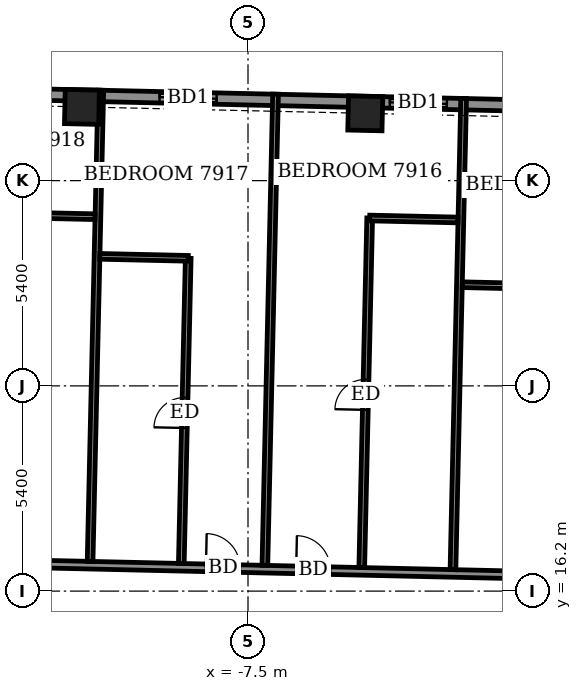
"""IFC4 building model, lengths in metres.
Left out: names, types, materials, properties, quantities, classifications, styles, units other than length and angle.
Written with IfcOpenShell. Run it as: python <this file> out.ifc"""

import sys

from ifc_helpers import new_model, si_unit, direction, frame, frame_2d, origin, origin_2d, place, context, subcontext, project, spatial, rectangle, extrude, element, fill, save


model = new_model("IFC4")
c1 = context("Model", 3, precision=1e-05, world=origin(), true_north=direction((0.0, 1.0)))
c2 = subcontext(c1, "Body", "Model", "MODEL_VIEW")
j1 = project(units=[si_unit("LENGTHUNIT", "METRE"), si_unit("PLANEANGLEUNIT", "RADIAN")], contexts=[c1])
p1 = place(None, origin())
s1 = spatial("IfcSite", under=j1, at=p1, CompositionType="ELEMENT")
p2 = place(p1, origin())
s2 = spatial("IfcBuilding", under=s1, at=p2, CompositionType="ELEMENT")
p3 = place(p2, frame((0.0, 0.0, 309.7)))
s3 = spatial("IfcBuildingStorey", under=s2, at=p3, CompositionType="ELEMENT", Elevation=309.7)
for number, where, z_axis, x_axis in (
    (1, (-4.414, 28.771, -0.55), (0.0, 0.0, 1.0), (-1.0, 0.023, 0.0)),
    (2, (-11.869, 28.94, -0.55), (0.0, 0.0, 1.0), (-1.0, 0.023, 0.0)),
):
    element("IfcColumn", number, at=place(p3, frame(where, z_axis=z_axis, x_axis=x_axis)), inside=s3, PredefinedType="COLUMN", context=c2, shape_type="SweptSolid", body=[
        extrude(rectangle(XDim=0.9, YDim=0.9, at=origin_2d()), origin(), (0.0, 0.0, 1.0), 3.6),
    ])
p4 = place(p3, frame((25.264, 28.397, 0.0), z_axis=(0.0, 0.0, 1.0), x_axis=(-0.999742391375, 0.022696935658, 0.0)))
e3 = element("IfcWall", 3, at=p4, inside=s3, PredefinedType="SOLIDWALL", context=c2, shape_type="SweptSolid", body=[
    extrude(rectangle(XDim=51.9, YDim=0.3, at=frame_2d((25.95, 0.0))), origin(), (0.0, 0.0, 1.0), 2.5),
])
p5 = place(p4, frame((1.898, 0.0, 0.0)))
e4 = element("IfcOpeningElement", 4, at=p5, cuts=e3, PredefinedType="OPENING", context=c2, shape_type="SweptSolid", body=[
    extrude(rectangle(XDim=1.5, YDim=2.4, at=frame_2d((0.75, 1.2))), frame((0.0, 0.16, 0.0), z_axis=(0.0, -1.0, 0.0), x_axis=(1.0, 0.0, 0.0)), (0.0, 0.0, 1.0), 0.32),
])
p6 = place(p4, frame((5.229, 0.0, 0.0)))
e5 = element("IfcOpeningElement", 5, at=p6, cuts=e3, PredefinedType="OPENING", context=c2, shape_type="SweptSolid", body=[
    extrude(rectangle(XDim=1.5, YDim=2.4, at=frame_2d((0.75, 1.2))), frame((0.0, 0.16, 0.0), z_axis=(0.0, -1.0, 0.0), x_axis=(1.0, 0.0, 0.0)), (0.0, 0.0, 1.0), 0.32),
])
p7 = place(p4, frame((10.7, 0.0, 0.0)))
e6 = element("IfcOpeningElement", 6, at=p7, cuts=e3, PredefinedType="OPENING", context=c2, shape_type="SweptSolid", body=[
    extrude(rectangle(XDim=1.5, YDim=2.4, at=frame_2d((0.75, 1.2))), frame((0.0, 0.16, 0.0), z_axis=(0.0, -1.0, 0.0), x_axis=(1.0, 0.0, 0.0)), (0.0, 0.0, 1.0), 0.32),
])
p8 = place(p4, frame((15.832, 0.0, 0.0)))
e7 = element("IfcOpeningElement", 7, at=p8, cuts=e3, PredefinedType="OPENING", context=c2, shape_type="SweptSolid", body=[
    extrude(rectangle(XDim=1.5, YDim=2.4, at=frame_2d((0.75, 1.2))), frame((0.0, 0.16, 0.0), z_axis=(0.0, -1.0, 0.0), x_axis=(1.0, 0.0, 0.0)), (0.0, 0.0, 1.0), 0.32),
])
p9 = place(p4, frame((19.361, 0.0, 0.0)))
e8 = element("IfcOpeningElement", 8, at=p9, cuts=e3, PredefinedType="OPENING", context=c2, shape_type="SweptSolid", body=[
    extrude(rectangle(XDim=1.5, YDim=2.4, at=frame_2d((0.75, 1.2))), frame((0.0, 0.16, 0.0), z_axis=(0.0, -1.0, 0.0), x_axis=(1.0, 0.0, 0.0)), (0.0, 0.0, 1.0), 0.32),
])
p10 = place(p4, frame((24.1, 0.0, 0.0)))
e9 = element("IfcOpeningElement", 9, at=p10, cuts=e3, PredefinedType="OPENING", context=c2, shape_type="SweptSolid", body=[
    extrude(rectangle(XDim=1.5, YDim=2.4, at=frame_2d((0.75, 1.2))), frame((0.0, 0.16, 0.0), z_axis=(0.0, -1.0, 0.0), x_axis=(1.0, 0.0, 0.0)), (0.0, 0.0, 1.0), 0.32),
])
p11 = place(p4, frame((27.539, 0.0, 0.0)))
e10 = element("IfcOpeningElement", 10, at=p11, cuts=e3, PredefinedType="OPENING", context=c2, shape_type="SweptSolid", body=[
    extrude(rectangle(XDim=1.5, YDim=2.4, at=frame_2d((0.75, 1.2))), frame((0.0, 0.16, 0.0), z_axis=(0.0, -1.0, 0.0), x_axis=(1.0, 0.0, 0.0)), (0.0, 0.0, 1.0), 0.32),
])
p12 = place(p4, frame((33.6, 0.0, 0.0)))
e11 = element("IfcOpeningElement", 11, at=p12, cuts=e3, PredefinedType="OPENING", context=c2, shape_type="SweptSolid", body=[
    extrude(rectangle(XDim=1.5, YDim=2.4, at=frame_2d((0.75, 1.2))), frame((0.0, 0.16, 0.0), z_axis=(0.0, -1.0, 0.0), x_axis=(1.0, 0.0, 0.0)), (0.0, 0.0, 1.0), 0.32),
])
p13 = place(p4, frame((38.643, 0.0, 0.0)))
e12 = element("IfcOpeningElement", 12, at=p13, cuts=e3, PredefinedType="OPENING", context=c2, shape_type="SweptSolid", body=[
    extrude(rectangle(XDim=1.5, YDim=2.4, at=frame_2d((0.75, 1.2))), frame((0.0, 0.16, 0.0), z_axis=(0.0, -1.0, 0.0), x_axis=(1.0, 0.0, 0.0)), (0.0, 0.0, 1.0), 0.32),
])
p14 = place(p4, frame((42.171, 0.0, 0.0)))
e13 = element("IfcOpeningElement", 13, at=p14, cuts=e3, PredefinedType="OPENING", context=c2, shape_type="SweptSolid", body=[
    extrude(rectangle(XDim=1.5, YDim=2.4, at=frame_2d((0.75, 1.2))), frame((0.0, 0.16, 0.0), z_axis=(0.0, -1.0, 0.0), x_axis=(1.0, 0.0, 0.0)), (0.0, 0.0, 1.0), 0.32),
])
p15 = place(p4, frame((47.637, 0.0, 0.9)))
e14 = element("IfcOpeningElement", 14, at=p15, cuts=e3, PredefinedType="OPENING", context=c2, shape_type="SweptSolid", body=[
    extrude(rectangle(XDim=2.4, YDim=1.5, at=frame_2d((1.2, 0.75))), frame((0.0, 0.16, 0.0), z_axis=(0.0, -1.0, 0.0), x_axis=(1.0, 0.0, 0.0)), (0.0, 0.0, 1.0), 0.32),
])
p16 = place(p3, frame((-30.652, 17.313, 0.0), z_axis=(0.0, 0.0, 1.0), x_axis=(0.999742623764, -0.02268669719, 0.0)))
e15 = element("IfcWall", 15, at=p16, inside=s3, PredefinedType="PARTITIONING", context=c2, shape_type="SweptSolid", body=[
    extrude(rectangle(XDim=58.8, YDim=0.2, at=frame_2d((29.4, 0.0))), origin(), (0.0, 0.0, 1.0), 3.05),
])
p17 = place(p16, frame((54.601, 0.0, 0.0)))
e16 = element("IfcOpeningElement", 16, at=p17, cuts=e15, PredefinedType="OPENING", context=c2, shape_type="SweptSolid", body=[
    extrude(rectangle(XDim=1.0, YDim=2.1, at=frame_2d((0.5, 1.05))), frame((0.0, 0.11, 0.0), z_axis=(0.0, -1.0, 0.0), x_axis=(1.0, 0.0, 0.0)), (0.0, 0.0, 1.0), 0.22),
])
p18 = place(p16, frame((49.35, 0.0, 0.0)))
e17 = element("IfcOpeningElement", 17, at=p18, cuts=e15, PredefinedType="OPENING", context=c2, shape_type="SweptSolid", body=[
    extrude(rectangle(XDim=0.9, YDim=2.1, at=frame_2d((0.45, 1.05))), frame((0.0, 0.11, 0.0), z_axis=(0.0, -1.0, 0.0), x_axis=(1.0, 0.0, 0.0)), (0.0, 0.0, 1.0), 0.22),
])
p19 = place(p16, frame((42.55, 0.0, 0.0)))
e18 = element("IfcOpeningElement", 18, at=p19, cuts=e15, PredefinedType="OPENING", context=c2, shape_type="SweptSolid", body=[
    extrude(rectangle(XDim=0.9, YDim=2.1, at=frame_2d((0.45, 1.05))), frame((0.0, 0.11, 0.0), z_axis=(0.0, -1.0, 0.0), x_axis=(1.0, 0.0, 0.0)), (0.0, 0.0, 1.0), 0.22),
])
p20 = place(p16, frame((40.475, 0.0, 0.0)))
e19 = element("IfcOpeningElement", 19, at=p20, cuts=e15, PredefinedType="OPENING", context=c2, shape_type="SweptSolid", body=[
    extrude(rectangle(XDim=0.9, YDim=2.1, at=frame_2d((0.45, 1.05))), frame((0.0, 0.11, 0.0), z_axis=(0.0, -1.0, 0.0), x_axis=(1.0, 0.0, 0.0)), (0.0, 0.0, 1.0), 0.22),
])
p21 = place(p16, frame((33.6, 0.0, 0.0)))
e20 = element("IfcOpeningElement", 20, at=p21, cuts=e15, PredefinedType="OPENING", context=c2, shape_type="SweptSolid", body=[
    extrude(rectangle(XDim=0.9, YDim=2.1, at=frame_2d((0.45, 1.05))), frame((0.0, 0.11, 0.0), z_axis=(0.0, -1.0, 0.0), x_axis=(1.0, 0.0, 0.0)), (0.0, 0.0, 1.0), 0.22),
])
p22 = place(p16, frame((31.55, 0.0, 0.0)))
e21 = element("IfcOpeningElement", 21, at=p22, cuts=e15, PredefinedType="OPENING", context=c2, shape_type="SweptSolid", body=[
    extrude(rectangle(XDim=0.9, YDim=2.1, at=frame_2d((0.45, 1.05))), frame((0.0, 0.11, 0.0), z_axis=(0.0, -1.0, 0.0), x_axis=(1.0, 0.0, 0.0)), (0.0, 0.0, 1.0), 0.22),
])
p23 = place(p16, frame((24.425, 0.0, 0.0)))
e22 = element("IfcOpeningElement", 22, at=p23, cuts=e15, PredefinedType="OPENING", context=c2, shape_type="SweptSolid", body=[
    extrude(rectangle(XDim=0.9, YDim=2.1, at=frame_2d((0.45, 1.05))), frame((0.0, 0.11, 0.0), z_axis=(0.0, -1.0, 0.0), x_axis=(1.0, 0.0, 0.0)), (0.0, 0.0, 1.0), 0.22),
])
p24 = place(p16, frame((22.05, 0.0, 0.0)))
e23 = element("IfcOpeningElement", 23, at=p24, cuts=e15, PredefinedType="OPENING", context=c2, shape_type="SweptSolid", body=[
    extrude(rectangle(XDim=0.9, YDim=2.1, at=frame_2d((0.45, 1.05))), frame((0.0, 0.11, 0.0), z_axis=(0.0, -1.0, 0.0), x_axis=(1.0, 0.0, 0.0)), (0.0, 0.0, 1.0), 0.22),
])
p25 = place(p16, frame((14.95, 0.0, 0.0)))
e24 = element("IfcOpeningElement", 24, at=p25, cuts=e15, PredefinedType="OPENING", context=c2, shape_type="SweptSolid", body=[
    extrude(rectangle(XDim=0.9, YDim=2.1, at=frame_2d((0.45, 1.05))), frame((0.0, 0.11, 0.0), z_axis=(0.0, -1.0, 0.0), x_axis=(1.0, 0.0, 0.0)), (0.0, 0.0, 1.0), 0.22),
])
p26 = place(p16, frame((12.525, 0.0, 0.0)))
e25 = element("IfcOpeningElement", 25, at=p26, cuts=e15, PredefinedType="OPENING", context=c2, shape_type="SweptSolid", body=[
    extrude(rectangle(XDim=0.9, YDim=2.1, at=frame_2d((0.45, 1.05))), frame((0.0, 0.11, 0.0), z_axis=(0.0, -1.0, 0.0), x_axis=(1.0, 0.0, 0.0)), (0.0, 0.0, 1.0), 0.22),
])
p27 = place(p16, frame((4.032, 0.0, 0.0)))
e26 = element("IfcOpeningElement", 26, at=p27, cuts=e15, PredefinedType="OPENING", context=c2, shape_type="SweptSolid", body=[
    extrude(rectangle(XDim=1.0, YDim=2.1, at=frame_2d((0.5, 1.05))), frame((0.0, 0.11, 0.0), z_axis=(0.0, -1.0, 0.0), x_axis=(1.0, 0.0, 0.0)), (0.0, 0.0, 1.0), 0.22),
])
p28 = place(p3, frame((-11.655, 16.982, 0.0), z_axis=(0.0, 0.0, 1.0), x_axis=(0.022740189192, 0.999741408463, 0.0)))
e27 = element("IfcWall", 27, at=p28, inside=s3, PredefinedType="PARTITIONING", context=c2, shape_type="SweptSolid", body=[
    extrude(rectangle(XDim=12.4, YDim=0.15, at=frame_2d((6.2, 0.0))), origin(), (0.0, 0.0, 1.0), 2.5),
])
p29 = place(p3, frame((-9.255, 16.928, 0.0), z_axis=(0.0, 0.0, 1.0), x_axis=(0.022650271266, 0.999743449697, 0.0)))
e28 = element("IfcWall", 28, at=p29, inside=s3, PredefinedType="PARTITIONING", context=c2, shape_type="SweptSolid", body=[
    extrude(rectangle(XDim=8.03, YDim=0.15, at=frame_2d((4.015, 0.0))), origin(), (0.0, 0.0, 1.0), 3.05),
])
p30 = place(p29, frame((3.565, 0.0, 0.0)))
e29 = element("IfcOpeningElement", 29, at=p30, cuts=e28, PredefinedType="OPENING", context=c2, shape_type="SweptSolid", body=[
    extrude(rectangle(XDim=0.8, YDim=2.1, at=frame_2d((0.4, 1.05))), frame((0.0, 0.085, 0.0), z_axis=(0.0, -1.0, 0.0), x_axis=(1.0, 0.0, 0.0)), (0.0, 0.0, 1.0), 0.17),
])
p31 = place(p3, frame((-7.056, 16.878, 0.0), z_axis=(0.0, 0.0, 1.0), x_axis=(0.022661475803, 0.999743195783, 0.0)))
e30 = element("IfcWall", 30, at=p31, inside=s3, PredefinedType="PARTITIONING", context=c2, shape_type="SweptSolid", body=[
    extrude(rectangle(XDim=12.4, YDim=0.15, at=frame_2d((6.2, 0.0))), origin(), (0.0, 0.0, 1.0), 2.5),
])
p32 = place(p3, frame((-4.507, 16.82, 0.0), z_axis=(0.0, 0.0, 1.0), x_axis=(0.022717185456, 0.999741931443, 0.0)))
e31 = element("IfcWall", 31, at=p32, inside=s3, PredefinedType="PARTITIONING", context=c2, shape_type="SweptSolid", body=[
    extrude(rectangle(XDim=9.199, YDim=0.15, at=frame_2d((4.6, 0.0))), origin(), (0.0, 0.0, 1.0), 3.05),
])
p33 = place(p32, frame((4.15, 0.0, 0.0)))
e32 = element("IfcOpeningElement", 32, at=p33, cuts=e31, PredefinedType="OPENING", context=c2, shape_type="SweptSolid", body=[
    extrude(rectangle(XDim=0.8, YDim=2.1, at=frame_2d((0.4, 1.05))), frame((0.0, 0.085, 0.0), z_axis=(0.0, -1.0, 0.0), x_axis=(1.0, 0.0, 0.0)), (0.0, 0.0, 1.0), 0.17),
])
p34 = place(p3, frame((-2.107, 16.765, 0.0), z_axis=(0.0, 0.0, 1.0), x_axis=(0.022661029756, 0.999743205894, 0.0)))
e33 = element("IfcWall", 33, at=p34, inside=s3, PredefinedType="PARTITIONING", context=c2, shape_type="SweptSolid", body=[
    extrude(rectangle(XDim=12.4, YDim=0.15, at=frame_2d((6.2, 0.0))), origin(), (0.0, 0.0, 1.0), 2.5),
])
p35 = place(p3, frame((-1.862, 24.262, 0.0), z_axis=(0.0, 0.0, 1.0), x_axis=(0.999740260747, -0.02279059109, 0.0)))
e34 = element("IfcWall", 34, at=p35, inside=s3, PredefinedType="PARTITIONING", context=c2, shape_type="SweptSolid", body=[
    extrude(rectangle(XDim=2.324, YDim=0.15, at=frame_2d((1.162, 0.0))), origin(), (0.0, 0.0, 1.0), 3.05),
])
p36 = place(p3, frame((-11.398, 25.008, 0.0), z_axis=(0.0, 0.0, 1.0), x_axis=(0.999749954681, -0.022361308448, 0.0)))
e35 = element("IfcWall", 35, at=p36, inside=s3, PredefinedType="PARTITIONING", context=c2, shape_type="SweptSolid", body=[
    extrude(rectangle(XDim=2.325, YDim=0.15, at=frame_2d((1.163, 0.0))), origin(), (0.0, 0.0, 1.0), 3.05),
])
p37 = place(p3, frame((-13.848, 26.104, 0.0), z_axis=(0.0, 0.0, 1.0), x_axis=(0.999740260747, -0.02279059109, 0.0)))
e36 = element("IfcWall", 36, at=p37, inside=s3, PredefinedType="PARTITIONING", context=c2, shape_type="SweptSolid", body=[
    extrude(rectangle(XDim=2.324, YDim=0.15, at=frame_2d((1.162, 0.0))), origin(), (0.0, 0.0, 1.0), 3.05),
])
p38 = place(p3, frame((-4.298, 26.017, 0.0), z_axis=(0.0, 0.0, 1.0), x_axis=(0.999750007167, -0.022358961731, 0.0)))
e37 = element("IfcWall", 37, at=p38, inside=s3, PredefinedType="PARTITIONING", context=c2, shape_type="SweptSolid", body=[
    extrude(rectangle(XDim=2.326, YDim=0.15, at=frame_2d((1.163, 0.0))), origin(), (0.0, 0.0, 1.0), 3.05),
])
p39 = place(p11, origin())
e38 = element("IfcDoor", 38, at=p39, inside=s3, OperationType="SLIDING_TO_LEFT", PredefinedType="DOOR", context=c2, shape_type="SweptSolid", body=[
    extrude(rectangle(XDim=1.5, YDim=2.4, at=frame_2d((0.75, 1.2))), frame((0.0, 0.025, 0.0), z_axis=(0.0, -1.0, 0.0), x_axis=(1.0, 0.0, 0.0)), (0.0, 0.0, 1.0), 0.05),
])
fill(e10, e38)
p40 = place(p12, origin())
e39 = element("IfcDoor", 39, at=p40, inside=s3, OperationType="SLIDING_TO_LEFT", PredefinedType="DOOR", context=c2, shape_type="SweptSolid", body=[
    extrude(rectangle(XDim=1.5, YDim=2.4, at=frame_2d((0.75, 1.2))), frame((0.0, 0.025, 0.0), z_axis=(0.0, -1.0, 0.0), x_axis=(1.0, 0.0, 0.0)), (0.0, 0.0, 1.0), 0.05),
])
fill(e11, e39)
p41 = place(p23, origin())
e40 = element("IfcDoor", 40, at=p41, inside=s3, OperationType="SINGLE_SWING_RIGHT", PredefinedType="DOOR", context=c2, shape_type="SweptSolid", body=[
    extrude(rectangle(XDim=0.9, YDim=2.1, at=frame_2d((0.45, 1.05))), frame((0.0, 0.025, 0.0), z_axis=(0.0, -1.0, 0.0), x_axis=(1.0, 0.0, 0.0)), (0.0, 0.0, 1.0), 0.05),
])
fill(e22, e40)
p42 = place(p33, origin())
e41 = element("IfcDoor", 41, at=p42, inside=s3, OperationType="SINGLE_SWING_RIGHT", PredefinedType="DOOR", context=c2, shape_type="SweptSolid", body=[
    extrude(rectangle(XDim=0.8, YDim=2.1, at=frame_2d((0.4, 1.05))), frame((0.0, 0.025, 0.0), z_axis=(0.0, -1.0, 0.0), x_axis=(1.0, 0.0, 0.0)), (0.0, 0.0, 1.0), 0.05),
])
fill(e32, e41)
p43 = place(p24, origin())
e42 = element("IfcDoor", 42, at=p43, inside=s3, OperationType="SINGLE_SWING_LEFT", PredefinedType="DOOR", context=c2, shape_type="SweptSolid", body=[
    extrude(rectangle(XDim=0.9, YDim=2.1, at=frame_2d((0.45, 1.05))), frame((0.0, 0.025, 0.0), z_axis=(0.0, -1.0, 0.0), x_axis=(1.0, 0.0, 0.0)), (0.0, 0.0, 1.0), 0.05),
])
fill(e23, e42)
p44 = place(p30, origin())
e43 = element("IfcDoor", 43, at=p44, inside=s3, OperationType="SINGLE_SWING_LEFT", PredefinedType="DOOR", context=c2, shape_type="SweptSolid", body=[
    extrude(rectangle(XDim=0.8, YDim=2.1, at=frame_2d((0.4, 1.05))), frame((0.0, 0.025, 0.0), z_axis=(0.0, -1.0, 0.0), x_axis=(1.0, 0.0, 0.0)), (0.0, 0.0, 1.0), 0.05),
])
fill(e29, e43)
save(model, sys.argv[1])
